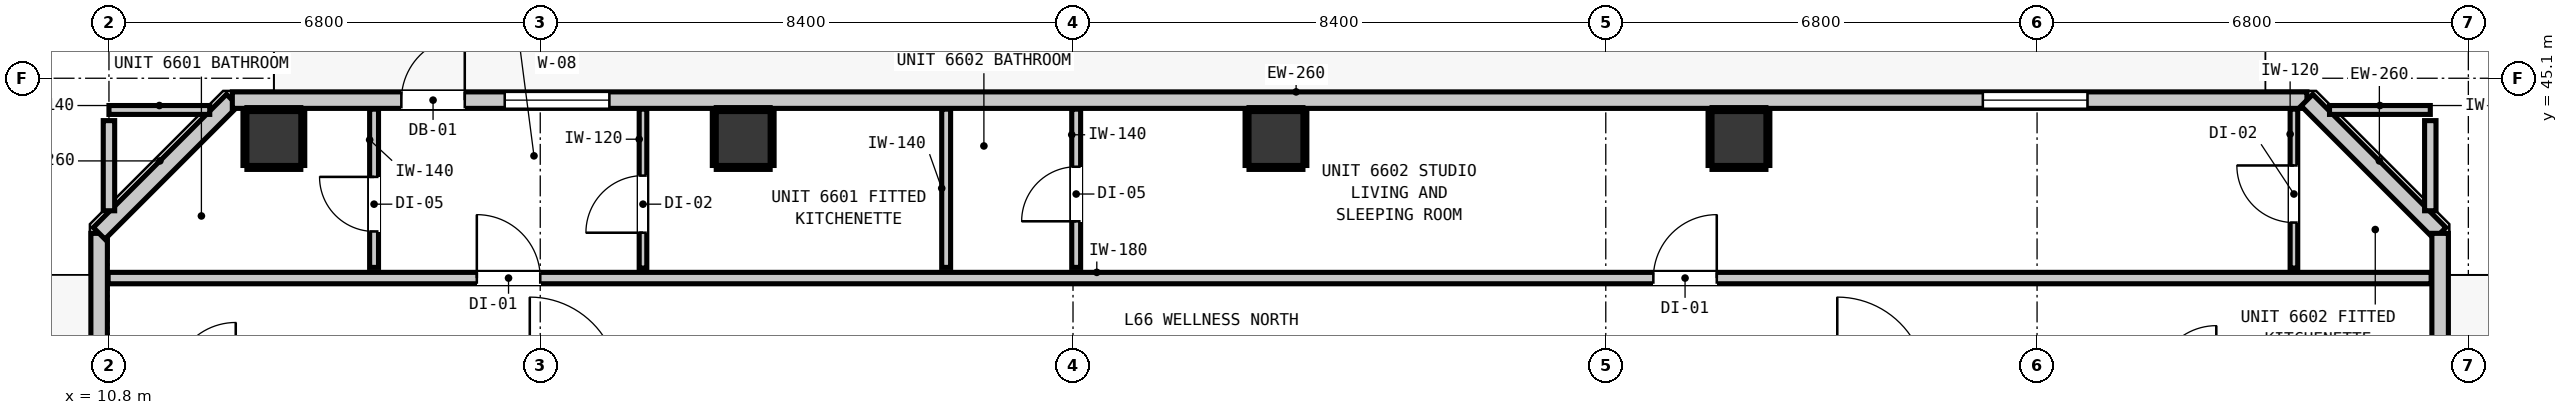
"""IFC4 building model, lengths in metres.
Left out: names, types, materials, properties, quantities, classifications, styles, units other than length and angle.
Written with IfcOpenShell. Run it as: python <this file> out.ifc"""

import sys

from ifc_helpers import new_model, si_unit, direction, frame, frame_2d, origin, origin_2d, place, context, subcontext, project, spatial, rectangle, extrude, element, fill, save


model = new_model("IFC4")
c1 = context("Model", 3, precision=1e-05, world=origin(), true_north=direction((0.0, 1.0)))
c2 = subcontext(c1, "Body", "Model", "MODEL_VIEW")
j1 = project(units=[si_unit("LENGTHUNIT", "METRE"), si_unit("PLANEANGLEUNIT", "RADIAN")], contexts=[c1])
p1 = place(None, origin())
s1 = spatial("IfcSite", under=j1, at=p1, CompositionType="ELEMENT")
p2 = place(p1, origin())
s2 = spatial("IfcBuilding", under=s1, at=p2, CompositionType="ELEMENT")
p3 = place(p2, frame((0.0, 0.0, 226.68)))
s3 = spatial("IfcBuildingStorey", under=s2, at=p3, CompositionType="ELEMENT", Elevation=226.68)
for number, where, z_axis, x_axis in (
    (1, (13.4, 44.15, 0.0), (0.0, 0.0, 1.0), (1.0, 0.0, 0.0)),
    (2, (20.8, 44.15, 0.0), (0.0, 0.0, 1.0), (1.0, 0.0, 0.0)),
    (3, (29.2, 44.15, 0.0), (0.0, 0.0, 1.0), (1.0, 0.0, 0.0)),
    (4, (36.5, 44.15, 0.0), (0.0, 0.0, 1.0), (1.0, 0.0, 0.0)),
):
    element("IfcColumn", number, at=place(p3, frame(where, z_axis=z_axis, x_axis=x_axis)), inside=s3, PredefinedType="COLUMN", context=c2, shape_type="SweptSolid", body=[
        extrude(rectangle(XDim=0.85, YDim=0.85, at=origin_2d()), origin(), (0.0, 0.0, 1.0), 4.18),
    ])
p4 = place(p3, frame((10.645, 12.345, 0.0), z_axis=(0.0, 0.0, 1.0), x_axis=(0.0, 1.0, 0.0)))
e5 = element("IfcWall", 5, at=p4, inside=s3, PredefinedType="STANDARD", context=c2, shape_type="SweptSolid", body=[
    extrude(rectangle(XDim=30.31, YDim=0.26, at=frame_2d((15.155, 0.0))), origin(), (0.0, 0.0, 1.0), 4.18),
])
p5 = place(p4, frame((0.91, 0.0, 0.0)))
e6 = element("IfcOpeningElement", 6, at=p5, cuts=e5, PredefinedType="OPENING", context=c2, shape_type="SweptSolid", body=[
    extrude(rectangle(XDim=1.0, YDim=2.15, at=frame_2d((0.5, 1.075))), frame((0.0, 0.14, 0.0), z_axis=(0.0, -1.0, 0.0), x_axis=(1.0, 0.0, 0.0)), (0.0, 0.0, 1.0), 0.28),
])
p6 = place(p4, frame((3.732, 0.0, 0.85)))
e7 = element("IfcOpeningElement", 7, at=p6, cuts=e5, PredefinedType="OPENING", context=c2, shape_type="SweptSolid", body=[
    extrude(rectangle(XDim=1.65, YDim=1.75, at=frame_2d((0.825, 0.875))), frame((0.0, 0.14, 0.0), z_axis=(0.0, -1.0, 0.0), x_axis=(1.0, 0.0, 0.0)), (0.0, 0.0, 1.0), 0.28),
])
p7 = place(p3, frame((10.645, 42.655, 0.0), z_axis=(0.0, 0.0, 1.0), x_axis=(0.707147883682, 0.707065676302, 0.0)))
e8 = element("IfcWall", 8, at=p7, inside=s3, PredefinedType="STANDARD", context=c2, shape_type="SweptSolid", body=[
    extrude(rectangle(XDim=2.97, YDim=0.26, at=frame_2d((1.485, 0.0))), origin(), (0.0, 0.0, 1.0), 4.18),
])
p8 = place(p3, frame((12.745, 44.755, 0.0), z_axis=(0.0, 0.0, 1.0), x_axis=(1.0, 0.0, 0.0)))
e9 = element("IfcWall", 9, at=p8, inside=s3, PredefinedType="STANDARD", context=c2, shape_type="SweptSolid", body=[
    extrude(rectangle(XDim=32.71, YDim=0.26, at=frame_2d((16.355, 0.0))), origin(), (0.0, 0.0, 1.0), 4.18),
])
p9 = place(p8, frame((2.665, 0.0, 0.0)))
e10 = element("IfcOpeningElement", 10, at=p9, cuts=e9, PredefinedType="OPENING", context=c2, shape_type="SweptSolid", body=[
    extrude(rectangle(XDim=1.0, YDim=2.15, at=frame_2d((0.5, 1.075))), frame((0.0, 0.14, 0.0), z_axis=(0.0, -1.0, 0.0), x_axis=(1.0, 0.0, 0.0)), (0.0, 0.0, 1.0), 0.28),
])
p10 = place(p8, frame((4.295, 0.0, 0.85)))
e11 = element("IfcOpeningElement", 11, at=p10, cuts=e9, PredefinedType="OPENING", context=c2, shape_type="SweptSolid", body=[
    extrude(rectangle(XDim=1.65, YDim=1.75, at=frame_2d((0.825, 0.875))), frame((0.0, 0.14, 0.0), z_axis=(0.0, -1.0, 0.0), x_axis=(1.0, 0.0, 0.0)), (0.0, 0.0, 1.0), 0.28),
])
p11 = place(p8, frame((27.6, 0.0, 0.85)))
e12 = element("IfcOpeningElement", 12, at=p11, cuts=e9, PredefinedType="OPENING", context=c2, shape_type="SweptSolid", body=[
    extrude(rectangle(XDim=1.65, YDim=1.75, at=frame_2d((0.825, 0.875))), frame((0.0, 0.14, 0.0), z_axis=(0.0, -1.0, 0.0), x_axis=(1.0, 0.0, 0.0)), (0.0, 0.0, 1.0), 0.28),
])
p12 = place(p3, frame((45.455, 44.755, 0.0), z_axis=(0.0, 0.0, 1.0), x_axis=(0.707106781187, -0.707106781187, 0.0)))
e13 = element("IfcWall", 13, at=p12, inside=s3, PredefinedType="STANDARD", context=c2, shape_type="SweptSolid", body=[
    extrude(rectangle(XDim=2.97, YDim=0.26, at=frame_2d((1.485, 0.0))), origin(), (0.0, 0.0, 1.0), 4.18),
])
p13 = place(p3, frame((47.555, 42.655, 0.0), z_axis=(0.0, 0.0, 1.0), x_axis=(0.0, -1.0, 0.0)))
e14 = element("IfcWall", 14, at=p13, inside=s3, PredefinedType="STANDARD", context=c2, shape_type="SweptSolid", body=[
    extrude(rectangle(XDim=30.31, YDim=0.26, at=frame_2d((15.155, 0.0))), origin(), (0.0, 0.0, 1.0), 4.18),
])
p14 = place(p13, frame((23.818, 0.0, 0.0)))
e15 = element("IfcOpeningElement", 15, at=p14, cuts=e14, PredefinedType="OPENING", context=c2, shape_type="SweptSolid", body=[
    extrude(rectangle(XDim=1.0, YDim=2.15, at=frame_2d((0.5, 1.075))), frame((0.0, 0.14, 0.0), z_axis=(0.0, -1.0, 0.0), x_axis=(1.0, 0.0, 0.0)), (0.0, 0.0, 1.0), 0.28),
])
p15 = place(p3, frame((10.787, 41.95, 0.0), z_axis=(0.0, 0.0, 1.0), x_axis=(1.0, 0.0, 0.0)))
e16 = element("IfcWall", 16, at=p15, inside=s3, PredefinedType="PARTITIONING", context=c2, shape_type="SweptSolid", body=[
    extrude(rectangle(XDim=36.626, YDim=0.18, at=frame_2d((18.313, 0.0))), origin(), (0.0, 0.0, 1.0), 4.18),
])
p16 = place(p15, frame((5.813, 0.0, 0.0)))
e17 = element("IfcOpeningElement", 17, at=p16, cuts=e16, PredefinedType="OPENING", context=c2, shape_type="SweptSolid", body=[
    extrude(rectangle(XDim=1.0, YDim=2.15, at=frame_2d((0.5, 1.075))), frame((0.0, 0.1, 0.0), z_axis=(0.0, -1.0, 0.0), x_axis=(1.0, 0.0, 0.0)), (0.0, 0.0, 1.0), 0.2),
])
p17 = place(p15, frame((24.363, 0.0, 0.0)))
e18 = element("IfcOpeningElement", 18, at=p17, cuts=e16, PredefinedType="OPENING", context=c2, shape_type="SweptSolid", body=[
    extrude(rectangle(XDim=1.0, YDim=2.15, at=frame_2d((0.5, 1.075))), frame((0.0, 0.1, 0.0), z_axis=(0.0, -1.0, 0.0), x_axis=(1.0, 0.0, 0.0)), (0.0, 0.0, 1.0), 0.2),
])
for number, where, z_axis, x_axis in (
    (19, (10.8, 44.6, 0.0), (0.0, 0.0, 1.0), (1.0, 0.0, 0.0)),
    (20, (45.811, 44.6, 0.0), (0.0, 0.0, 1.0), (1.0, 0.0, 0.0)),
):
    element("IfcWall", number, at=place(p3, frame(where, z_axis=z_axis, x_axis=x_axis)), inside=s3, PredefinedType="PARTITIONING", context=c2, shape_type="SweptSolid", body=[
        extrude(rectangle(XDim=1.589, YDim=0.14, at=frame_2d((0.794, 0.0))), origin(), (0.0, 0.0, 1.0), 4.18),
    ])
for number, where, z_axis, x_axis in (
    (21, (10.8, 43.011, 0.0), (0.0, 0.0, 1.0), (0.0, 1.0, 0.0)),
    (22, (47.4, 43.011, 0.0), (0.0, 0.0, 1.0), (0.0, 1.0, 0.0)),
):
    element("IfcWall", number, at=place(p3, frame(where, z_axis=z_axis, x_axis=x_axis)), inside=s3, PredefinedType="PARTITIONING", context=c2, shape_type="SweptSolid", body=[
        extrude(rectangle(XDim=1.421, YDim=0.18, at=frame_2d((0.71, 0.0))), origin(), (0.0, 0.0, 1.0), 4.18),
    ])
p18 = place(p3, frame((14.98, 42.118, 0.0), z_axis=(0.0, 0.0, 1.0), x_axis=(0.0, 1.0, 0.0)))
e23 = element("IfcWall", 23, at=p18, inside=s3, PredefinedType="PARTITIONING", context=c2, shape_type="SweptSolid", body=[
    extrude(rectangle(XDim=2.495, YDim=0.14, at=frame_2d((1.248, 0.0))), origin(), (0.0, 0.0, 1.0), 4.18),
])
p19 = place(p18, frame((0.567, 0.0, 0.0)))
e24 = element("IfcOpeningElement", 24, at=p19, cuts=e23, PredefinedType="OPENING", context=c2, shape_type="SweptSolid", body=[
    extrude(rectangle(XDim=0.86, YDim=2.02, at=frame_2d((0.43, 1.01))), frame((0.0, 0.08, 0.0), z_axis=(0.0, -1.0, 0.0), x_axis=(1.0, 0.0, 0.0)), (0.0, 0.0, 1.0), 0.16),
])
p20 = place(p3, frame((24.0, 42.118, 0.0), z_axis=(0.0, 0.0, 1.0), x_axis=(0.0, 1.0, 0.0)))
e25 = element("IfcWall", 25, at=p20, inside=s3, PredefinedType="PARTITIONING", context=c2, shape_type="SweptSolid", body=[
    extrude(rectangle(XDim=2.495, YDim=0.14, at=frame_2d((1.248, 0.0))), origin(), (0.0, 0.0, 1.0), 4.18),
])
p21 = place(p3, frame((26.05, 42.118, 0.0), z_axis=(0.0, 0.0, 1.0), x_axis=(0.0, 1.0, 0.0)))
e26 = element("IfcWall", 26, at=p21, inside=s3, PredefinedType="PARTITIONING", context=c2, shape_type="SweptSolid", body=[
    extrude(rectangle(XDim=2.495, YDim=0.14, at=frame_2d((1.248, 0.0))), origin(), (0.0, 0.0, 1.0), 4.18),
])
p22 = place(p21, frame((0.727, 0.0, 0.0)))
e27 = element("IfcOpeningElement", 27, at=p22, cuts=e26, PredefinedType="OPENING", context=c2, shape_type="SweptSolid", body=[
    extrude(rectangle(XDim=0.86, YDim=2.02, at=frame_2d((0.43, 1.01))), frame((0.0, 0.08, 0.0), z_axis=(0.0, -1.0, 0.0), x_axis=(1.0, 0.0, 0.0)), (0.0, 0.0, 1.0), 0.16),
])
p23 = place(p3, frame((19.22, 42.108, 0.0), z_axis=(0.0, 0.0, 1.0), x_axis=(0.0, 1.0, 0.0)))
e28 = element("IfcWall", 28, at=p23, inside=s3, PredefinedType="PARTITIONING", context=c2, shape_type="SweptSolid", body=[
    extrude(rectangle(XDim=2.505, YDim=0.12, at=frame_2d((1.252, 0.0))), origin(), (0.0, 0.0, 1.0), 4.18),
])
p24 = place(p23, frame((0.557, 0.0, 0.0)))
e29 = element("IfcOpeningElement", 29, at=p24, cuts=e28, PredefinedType="OPENING", context=c2, shape_type="SweptSolid", body=[
    extrude(rectangle(XDim=0.9, YDim=2.1, at=frame_2d((0.45, 1.05))), frame((0.0, 0.07, 0.0), z_axis=(0.0, -1.0, 0.0), x_axis=(1.0, 0.0, 0.0)), (0.0, 0.0, 1.0), 0.14),
])
p25 = place(p3, frame((45.25, 42.108, 0.0), z_axis=(0.0, 0.0, 1.0), x_axis=(0.0, 1.0, 0.0)))
e30 = element("IfcWall", 30, at=p25, inside=s3, PredefinedType="PARTITIONING", context=c2, shape_type="SweptSolid", body=[
    extrude(rectangle(XDim=2.505, YDim=0.12, at=frame_2d((1.252, 0.0))), origin(), (0.0, 0.0, 1.0), 4.18),
])
p26 = place(p25, frame((0.717, 0.0, 0.0)))
e31 = element("IfcOpeningElement", 31, at=p26, cuts=e30, PredefinedType="OPENING", context=c2, shape_type="SweptSolid", body=[
    extrude(rectangle(XDim=0.9, YDim=2.1, at=frame_2d((0.45, 1.05))), frame((0.0, 0.07, 0.0), z_axis=(0.0, -1.0, 0.0), x_axis=(1.0, 0.0, 0.0)), (0.0, 0.0, 1.0), 0.14),
])
for number, where, z_axis, x_axis in (
    (32, (12.975, 43.693, 0.0), (0.0, 0.0, 1.0), (1.0, 0.0, 0.0)),
    (33, (12.975, 44.607, 0.0), (0.0, 0.0, 1.0), (1.0, 0.0, 0.0)),
    (34, (12.943, 43.725, 0.0), (0.0, 0.0, 1.0), (0.0, 1.0, 0.0)),
    (35, (13.857, 43.725, 0.0), (0.0, 0.0, 1.0), (0.0, 1.0, 0.0)),
):
    element("IfcWall", number, at=place(p3, frame(where, z_axis=z_axis, x_axis=x_axis)), inside=s3, PredefinedType="PARTITIONING", context=c2, shape_type="SweptSolid", body=[
        extrude(rectangle(XDim=0.85, YDim=0.06, at=frame_2d((0.425, 0.0))), origin(), (0.0, 0.0, 1.0), 1.45),
    ])
for number, where, z_axis, x_axis in (
    (36, (20.375, 43.693, 0.0), (0.0, 0.0, 1.0), (1.0, 0.0, 0.0)),
    (37, (20.375, 44.607, 0.0), (0.0, 0.0, 1.0), (1.0, 0.0, 0.0)),
):
    element("IfcWall", number, at=place(p3, frame(where, z_axis=z_axis, x_axis=x_axis)), inside=s3, PredefinedType="PARTITIONING", context=c2, shape_type="SweptSolid", body=[
        extrude(rectangle(XDim=0.85, YDim=0.06, at=frame_2d((0.425, 0.0))), origin(), (0.0, 0.0, 1.0), 1.45),
    ])
for number, where, z_axis, x_axis in (
    (38, (20.343, 43.725, 0.0), (0.0, 0.0, 1.0), (0.0, 1.0, 0.0)),
    (39, (21.257, 43.725, 0.0), (0.0, 0.0, 1.0), (0.0, 1.0, 0.0)),
):
    element("IfcWall", number, at=place(p3, frame(where, z_axis=z_axis, x_axis=x_axis)), inside=s3, PredefinedType="PARTITIONING", context=c2, shape_type="SweptSolid", body=[
        extrude(rectangle(XDim=0.85, YDim=0.06, at=frame_2d((0.425, 0.0))), origin(), (0.0, 0.0, 1.0), 1.45),
    ])
for number, where, z_axis, x_axis in (
    (40, (28.775, 43.693, 0.0), (0.0, 0.0, 1.0), (1.0, 0.0, 0.0)),
    (41, (28.775, 44.607, 0.0), (0.0, 0.0, 1.0), (1.0, 0.0, 0.0)),
):
    element("IfcWall", number, at=place(p3, frame(where, z_axis=z_axis, x_axis=x_axis)), inside=s3, PredefinedType="PARTITIONING", context=c2, shape_type="SweptSolid", body=[
        extrude(rectangle(XDim=0.85, YDim=0.06, at=frame_2d((0.425, 0.0))), origin(), (0.0, 0.0, 1.0), 1.45),
    ])
for number, where, z_axis, x_axis in (
    (42, (28.743, 43.725, 0.0), (0.0, 0.0, 1.0), (0.0, 1.0, 0.0)),
    (43, (29.657, 43.725, 0.0), (0.0, 0.0, 1.0), (0.0, 1.0, 0.0)),
):
    element("IfcWall", number, at=place(p3, frame(where, z_axis=z_axis, x_axis=x_axis)), inside=s3, PredefinedType="PARTITIONING", context=c2, shape_type="SweptSolid", body=[
        extrude(rectangle(XDim=0.85, YDim=0.06, at=frame_2d((0.425, 0.0))), origin(), (0.0, 0.0, 1.0), 1.45),
    ])
for number, where, z_axis, x_axis in (
    (44, (36.075, 43.693, 0.0), (0.0, 0.0, 1.0), (1.0, 0.0, 0.0)),
    (45, (36.075, 44.607, 0.0), (0.0, 0.0, 1.0), (1.0, 0.0, 0.0)),
):
    element("IfcWall", number, at=place(p3, frame(where, z_axis=z_axis, x_axis=x_axis)), inside=s3, PredefinedType="PARTITIONING", context=c2, shape_type="SweptSolid", body=[
        extrude(rectangle(XDim=0.85, YDim=0.06, at=frame_2d((0.425, 0.0))), origin(), (0.0, 0.0, 1.0), 1.45),
    ])
for number, where, z_axis, x_axis in (
    (46, (36.043, 43.725, 0.0), (0.0, 0.0, 1.0), (0.0, 1.0, 0.0)),
    (47, (36.957, 43.725, 0.0), (0.0, 0.0, 1.0), (0.0, 1.0, 0.0)),
):
    element("IfcWall", number, at=place(p3, frame(where, z_axis=z_axis, x_axis=x_axis)), inside=s3, PredefinedType="PARTITIONING", context=c2, shape_type="SweptSolid", body=[
        extrude(rectangle(XDim=0.85, YDim=0.06, at=frame_2d((0.425, 0.0))), origin(), (0.0, 0.0, 1.0), 1.45),
    ])
p27 = place(p9, origin())
e48 = element("IfcDoor", 48, at=p27, inside=s3, OperationType="SINGLE_SWING_RIGHT", PredefinedType="DOOR", context=c2, shape_type="SweptSolid", body=[
    extrude(rectangle(XDim=1.0, YDim=2.15, at=frame_2d((0.5, 1.075))), frame((0.0, 0.025, 0.0), z_axis=(0.0, -1.0, 0.0), x_axis=(1.0, 0.0, 0.0)), (0.0, 0.0, 1.0), 0.05),
])
fill(e10, e48)
p28 = place(p10, origin())
e49 = element("IfcWindow", 49, at=p28, inside=s3, PartitioningType="SINGLE_PANEL", PredefinedType="WINDOW", context=c2, shape_type="SweptSolid", body=[
    extrude(rectangle(XDim=1.65, YDim=1.75, at=frame_2d((0.825, 0.875))), frame((0.0, 0.03, 0.0), z_axis=(0.0, -1.0, 0.0), x_axis=(1.0, 0.0, 0.0)), (0.0, 0.0, 1.0), 0.06),
])
fill(e11, e49)
p29 = place(p11, origin())
e50 = element("IfcWindow", 50, at=p29, inside=s3, PartitioningType="SINGLE_PANEL", PredefinedType="WINDOW", context=c2, shape_type="SweptSolid", body=[
    extrude(rectangle(XDim=1.65, YDim=1.75, at=frame_2d((0.825, 0.875))), frame((0.0, 0.03, 0.0), z_axis=(0.0, -1.0, 0.0), x_axis=(1.0, 0.0, 0.0)), (0.0, 0.0, 1.0), 0.06),
])
fill(e12, e50)
p30 = place(p16, origin())
e51 = element("IfcDoor", 51, at=p30, inside=s3, OperationType="SINGLE_SWING_LEFT", PredefinedType="DOOR", context=c2, shape_type="SweptSolid", body=[
    extrude(rectangle(XDim=1.0, YDim=2.15, at=frame_2d((0.5, 1.075))), frame((0.0, 0.025, 0.0), z_axis=(0.0, -1.0, 0.0), x_axis=(1.0, 0.0, 0.0)), (0.0, 0.0, 1.0), 0.05),
])
fill(e17, e51)
p31 = place(p19, origin())
e52 = element("IfcDoor", 52, at=p31, inside=s3, OperationType="SINGLE_SWING_RIGHT", PredefinedType="DOOR", context=c2, shape_type="SweptSolid", body=[
    extrude(rectangle(XDim=0.86, YDim=2.02, at=frame_2d((0.43, 1.01))), frame((0.0, 0.025, 0.0), z_axis=(0.0, -1.0, 0.0), x_axis=(1.0, 0.0, 0.0)), (0.0, 0.0, 1.0), 0.05),
])
fill(e24, e52)
p32 = place(p24, origin())
e53 = element("IfcDoor", 53, at=p32, inside=s3, OperationType="SINGLE_SWING_LEFT", PredefinedType="DOOR", context=c2, shape_type="SweptSolid", body=[
    extrude(rectangle(XDim=0.9, YDim=2.1, at=frame_2d((0.45, 1.05))), frame((0.0, 0.025, 0.0), z_axis=(0.0, -1.0, 0.0), x_axis=(1.0, 0.0, 0.0)), (0.0, 0.0, 1.0), 0.05),
])
fill(e29, e53)
p33 = place(p17, origin())
e54 = element("IfcDoor", 54, at=p33, inside=s3, OperationType="SINGLE_SWING_RIGHT", PredefinedType="DOOR", context=c2, shape_type="SweptSolid", body=[
    extrude(rectangle(XDim=1.0, YDim=2.15, at=frame_2d((0.5, 1.075))), frame((0.0, 0.025, 0.0), z_axis=(0.0, -1.0, 0.0), x_axis=(1.0, 0.0, 0.0)), (0.0, 0.0, 1.0), 0.05),
])
fill(e18, e54)
p34 = place(p22, origin())
e55 = element("IfcDoor", 55, at=p34, inside=s3, OperationType="SINGLE_SWING_LEFT", PredefinedType="DOOR", context=c2, shape_type="SweptSolid", body=[
    extrude(rectangle(XDim=0.86, YDim=2.02, at=frame_2d((0.43, 1.01))), frame((0.0, 0.025, 0.0), z_axis=(0.0, -1.0, 0.0), x_axis=(1.0, 0.0, 0.0)), (0.0, 0.0, 1.0), 0.05),
])
fill(e27, e55)
p35 = place(p26, origin())
e56 = element("IfcDoor", 56, at=p35, inside=s3, OperationType="SINGLE_SWING_RIGHT", PredefinedType="DOOR", context=c2, shape_type="SweptSolid", body=[
    extrude(rectangle(XDim=0.9, YDim=2.1, at=frame_2d((0.45, 1.05))), frame((0.0, 0.025, 0.0), z_axis=(0.0, -1.0, 0.0), x_axis=(1.0, 0.0, 0.0)), (0.0, 0.0, 1.0), 0.05),
])
fill(e31, e56)
save(model, sys.argv[1])
